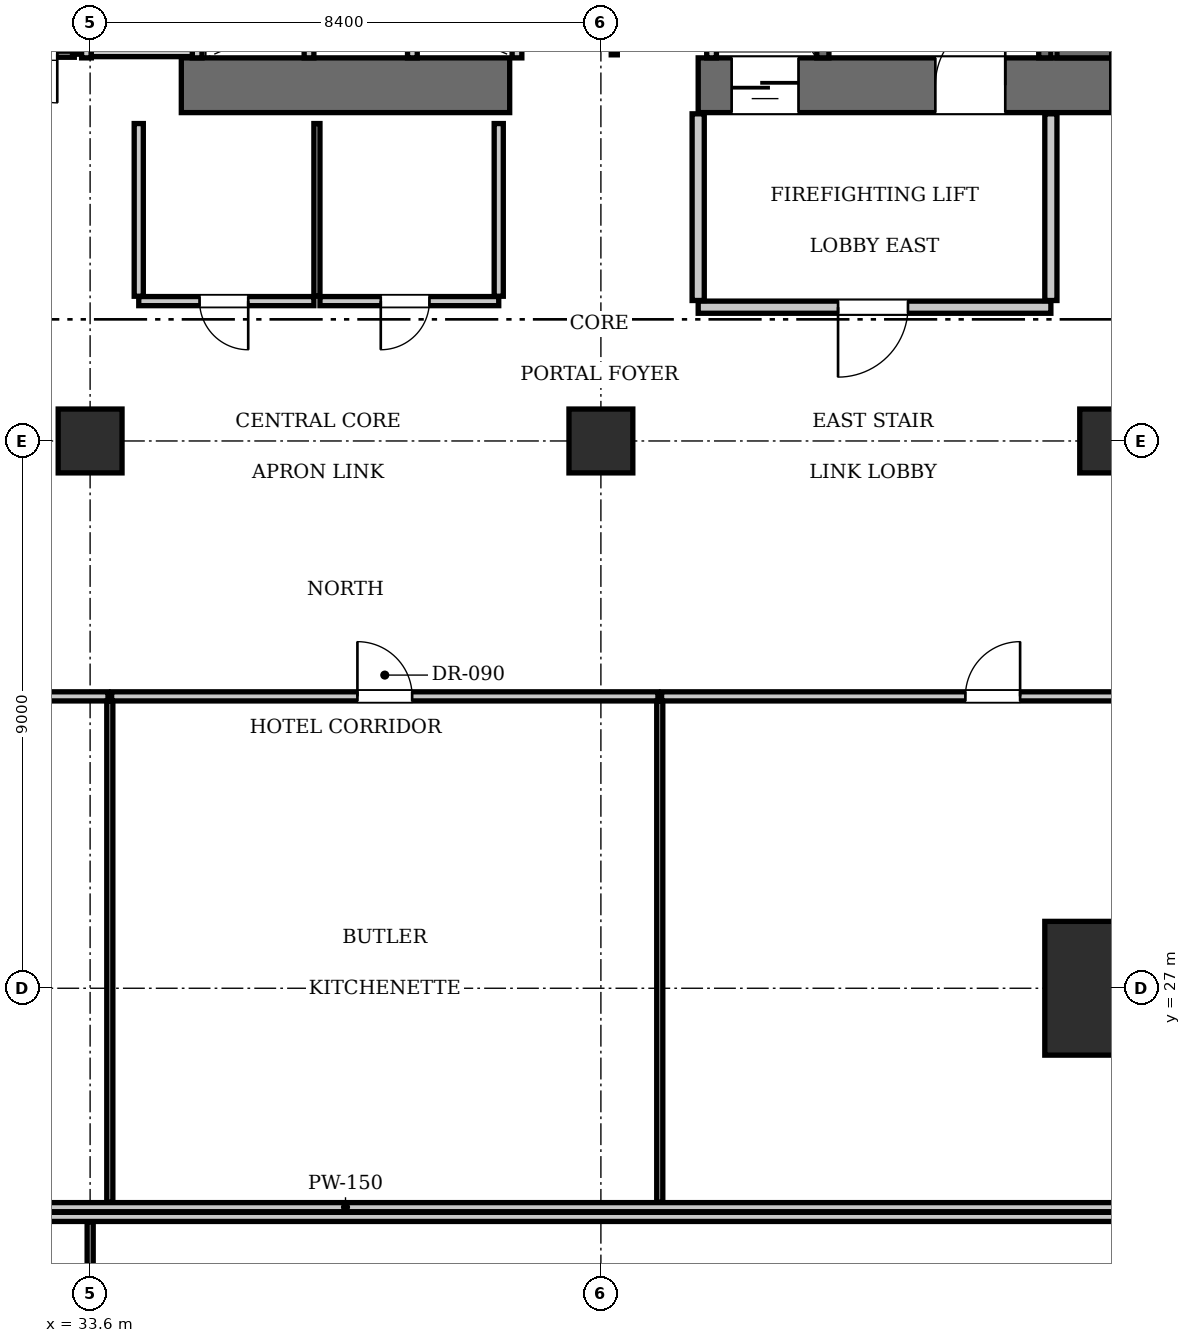
"""IFC4 building model, lengths in metres.
Left out: names, types, materials, properties, quantities, classifications, styles, units other than length and angle.
Written with IfcOpenShell. Run it as: python <this file> out.ifc"""

import sys

from ifc_helpers import new_model, si_unit, direction, frame, frame_2d, origin, origin_2d, place, context, subcontext, project, spatial, rectangle, extrude, element, fill, save


model = new_model("IFC4")
c1 = context("Model", 3, precision=1e-05, world=origin(), true_north=direction((0.0, 1.0)))
c2 = subcontext(c1, "Body", "Model", "MODEL_VIEW")
j1 = project(units=[si_unit("LENGTHUNIT", "METRE"), si_unit("PLANEANGLEUNIT", "RADIAN")], contexts=[c1])
p1 = place(None, origin())
s1 = spatial("IfcSite", under=j1, at=p1, CompositionType="ELEMENT")
p2 = place(p1, origin())
s2 = spatial("IfcBuilding", under=s1, at=p2, CompositionType="ELEMENT")
p3 = place(p2, frame((0.0, 0.0, 38.5)))
s3 = spatial("IfcBuildingStorey", under=s2, at=p3, CompositionType="ELEMENT", Elevation=38.5)
p4 = place(p3, frame((50.4, 27.0, 0.0), z_axis=(0.0, 0.0, 1.0), x_axis=(1.0, 0.0, 0.0)))
e1 = element("IfcColumn", 1, at=p4, inside=s3, PredefinedType="COLUMN", context=c2, shape_type="SweptSolid", body=[
    extrude(rectangle(XDim=2.2, YDim=2.2, at=origin_2d()), origin(), (0.0, 0.0, 1.0), 3.85),
])
p5 = place(p3, frame((35.1, 41.85, 0.0), z_axis=(0.0, 0.0, 1.0), x_axis=(1.0, 0.0, 0.0)))
e2 = element("IfcWall", 2, at=p5, inside=s3, PredefinedType="SHEAR", context=c2, shape_type="SweptSolid", body=[
    extrude(rectangle(XDim=5.4, YDim=0.9, at=frame_2d((2.7, 0.0))), origin(), (0.0, 0.0, 1.0), 3.85),
])
p6 = place(p3, frame((43.6, 41.85, 0.0), z_axis=(0.0, 0.0, 1.0), x_axis=(1.0, 0.0, 0.0)))
e3 = element("IfcWall", 3, at=p6, inside=s3, PredefinedType="SHEAR", context=c2, shape_type="SweptSolid", body=[
    extrude(rectangle(XDim=6.8, YDim=0.9, at=frame_2d((3.4, 0.0))), origin(), (0.0, 0.0, 1.0), 3.85),
])
p7 = place(p6, frame((3.9, 0.0, 0.0)))
e4 = element("IfcOpeningElement", 4, at=p7, cuts=e3, PredefinedType="OPENING", context=c2, shape_type="SweptSolid", body=[
    extrude(rectangle(XDim=1.15, YDim=2.15, at=frame_2d((0.575, 1.075))), frame((0.0, 0.46, 0.0), z_axis=(0.0, -1.0, 0.0), x_axis=(1.0, 0.0, 0.0)), (0.0, 0.0, 1.0), 0.92),
])
p8 = place(p6, frame((0.55, 0.0, 0.0)))
e5 = element("IfcOpeningElement", 5, at=p8, cuts=e3, PredefinedType="OPENING", context=c2, shape_type="SweptSolid", body=[
    extrude(rectangle(XDim=1.1, YDim=2.2, at=frame_2d((0.55, 1.1))), frame((0.0, 0.46, 0.0), z_axis=(0.0, -1.0, 0.0), x_axis=(1.0, 0.0, 0.0)), (0.0, 0.0, 1.0), 0.92),
])
p9 = place(p3, frame((49.95, 42.3, 0.0), z_axis=(0.0, 0.0, 1.0), x_axis=(0.0, 1.0, 0.0)))
e6 = element("IfcWall", 6, at=p9, inside=s3, PredefinedType="SHEAR", context=c2, shape_type="SweptSolid", body=[
    extrude(rectangle(XDim=1.6, YDim=0.9, at=frame_2d((0.8, 0.0))), origin(), (0.0, 0.0, 1.0), 3.85),
])
for number, where, z_axis, x_axis in (
    (7, (33.6, 36.0, 0.0), (0.0, 0.0, 1.0), (1.0, 0.0, 0.0)),
    (8, (42.0, 36.0, 0.0), (0.0, 0.0, 1.0), (1.0, 0.0, 0.0)),
    (9, (50.4, 36.0, 0.0), (0.0, 0.0, 1.0), (1.0, 0.0, 0.0)),
):
    element("IfcColumn", number, at=place(p3, frame(where, z_axis=z_axis, x_axis=x_axis)), inside=s3, PredefinedType="COLUMN", context=c2, shape_type="SweptSolid", body=[
        extrude(rectangle(XDim=1.05, YDim=1.05, at=origin_2d()), origin(), (0.0, 0.0, 1.0), 3.85),
    ])
p10 = place(p3, frame((45.65, 42.3, 0.0), z_axis=(0.0, 0.0, 1.0), x_axis=(0.0, 1.0, 0.0)))
e10 = element("IfcWall", 10, at=p10, inside=s3, PredefinedType="SOLIDWALL", context=c2, shape_type="SweptSolid", body=[
    extrude(rectangle(XDim=8.85, YDim=0.2, at=frame_2d((4.425, 0.0))), origin(), (0.0, 0.0, 1.0), 3.61),
])
p11 = place(p3, frame((49.3, 42.3, 0.0), z_axis=(0.0, 0.0, 1.0), x_axis=(0.0, 1.0, 0.0)))
e11 = element("IfcWall", 11, at=p11, inside=s3, PredefinedType="SOLIDWALL", context=c2, shape_type="SweptSolid", body=[
    extrude(rectangle(XDim=1.58, YDim=0.2, at=frame_2d((0.79, 0.0))), origin(), (0.0, 0.0, 1.0), 3.61),
])
p12 = place(p3, frame((43.82, 42.3, 0.0), z_axis=(0.0, 0.0, 1.0), x_axis=(0.0, 1.0, 0.0)))
e12 = element("IfcWall", 12, at=p12, inside=s3, PredefinedType="SOLIDWALL", context=c2, shape_type="SweptSolid", body=[
    extrude(rectangle(XDim=2.44, YDim=0.16, at=frame_2d((1.22, 0.0))), origin(), (0.0, 0.0, 1.0), 3.61),
])
for number, where, z_axis, x_axis in (
    (13, (37.2, 42.3, 0.0), (0.0, 0.0, 1.0), (0.0, 1.0, 0.0)),
    (14, (38.9, 42.3, 0.0), (0.0, 0.0, 1.0), (0.0, 1.0, 0.0)),
    (15, (40.62, 42.3, 0.0), (0.0, 0.0, 1.0), (0.0, 1.0, 0.0)),
):
    element("IfcWall", number, at=place(p3, frame(where, z_axis=z_axis, x_axis=x_axis)), inside=s3, PredefinedType="SOLIDWALL", context=c2, shape_type="SweptSolid", body=[
        extrude(rectangle(XDim=2.05, YDim=0.16, at=frame_2d((1.025, 0.0))), origin(), (0.0, 0.0, 1.0), 3.61),
    ])
for number, where, z_axis, x_axis in (
    (16, (33.54, 42.3, 0.0), (0.0, 0.0, 1.0), (0.0, 1.0, 0.0)),
    (17, (35.36, 42.3, 0.0), (0.0, 0.0, 1.0), (0.0, 1.0, 0.0)),
):
    element("IfcWall", number, at=place(p3, frame(where, z_axis=z_axis, x_axis=x_axis)), inside=s3, PredefinedType="SOLIDWALL", context=c2, shape_type="SweptSolid", body=[
        extrude(rectangle(XDim=2.1, YDim=0.16, at=frame_2d((1.05, 0.0))), origin(), (0.0, 0.0, 1.0), 3.61),
    ])
p13 = place(p3, frame((33.62, 42.4, 0.0), z_axis=(0.0, 0.0, 1.0), x_axis=(1.0, 0.0, 0.0)))
e18 = element("IfcWall", 18, at=p13, inside=s3, PredefinedType="SOLIDWALL", context=c2, shape_type="SweptSolid", body=[
    extrude(rectangle(XDim=1.66, YDim=0.16, at=frame_2d((0.83, 0.0))), origin(), (0.0, 0.0, 1.0), 3.61),
])
p14 = place(p3, frame((43.6, 38.2, 0.0), z_axis=(0.0, 0.0, 1.0), x_axis=(1.0, 0.0, 0.0)))
e19 = element("IfcWall", 19, at=p14, inside=s3, PredefinedType="PARTITIONING", context=c2, shape_type="SweptSolid", body=[
    extrude(rectangle(XDim=5.8, YDim=0.2, at=frame_2d((2.9, 0.0))), origin(), (0.0, 0.0, 1.0), 3.61),
])
p15 = place(p14, frame((2.3, 0.0, 0.0)))
e20 = element("IfcOpeningElement", 20, at=p15, cuts=e19, PredefinedType="OPENING", context=c2, shape_type="SweptSolid", body=[
    extrude(rectangle(XDim=1.15, YDim=2.15, at=frame_2d((0.575, 1.075))), frame((0.0, 0.11, 0.0), z_axis=(0.0, -1.0, 0.0), x_axis=(1.0, 0.0, 0.0)), (0.0, 0.0, 1.0), 0.22),
])
for number, where, z_axis, x_axis in (
    (21, (43.6, 38.31, 0.0), (0.0, 0.0, 1.0), (0.0, 1.0, 0.0)),
    (22, (49.4, 38.31, 0.0), (0.0, 0.0, 1.0), (0.0, 1.0, 0.0)),
):
    element("IfcWall", number, at=place(p3, frame(where, z_axis=z_axis, x_axis=x_axis)), inside=s3, PredefinedType="PARTITIONING", context=c2, shape_type="SweptSolid", body=[
        extrude(rectangle(XDim=3.07, YDim=0.2, at=frame_2d((1.535, 0.0))), origin(), (0.0, 0.0, 1.0), 3.61),
    ])
p16 = place(p3, frame((32.02, 42.36, 0.0), z_axis=(0.0, 0.0, 1.0), x_axis=(1.0, 0.0, 0.0)))
e23 = element("IfcWall", 23, at=p16, inside=s3, PredefinedType="PARTITIONING", context=c2, shape_type="SweptSolid", body=[
    extrude(rectangle(XDim=1.32, YDim=0.1, at=frame_2d((0.66, 0.0))), origin(), (0.0, 0.0, 1.0), 3.61),
])
p17 = place(p16, frame((0.24, 0.0, 0.0)))
e24 = element("IfcOpeningElement", 24, at=p17, cuts=e23, PredefinedType="OPENING", context=c2, shape_type="SweptSolid", body=[
    extrude(rectangle(XDim=0.8, YDim=2.05, at=frame_2d((0.4, 1.025))), frame((0.0, 0.06, 0.0), z_axis=(0.0, -1.0, 0.0), x_axis=(1.0, 0.0, 0.0)), (0.0, 0.0, 1.0), 0.12),
])
p18 = place(p3, frame((33.36, 42.36, 0.0), z_axis=(0.0, 0.0, 1.0), x_axis=(0.0, 1.0, 0.0)))
e25 = element("IfcWall", 25, at=p18, inside=s3, PredefinedType="PARTITIONING", context=c2, shape_type="SweptSolid", body=[
    extrude(rectangle(XDim=2.58, YDim=0.1, at=frame_2d((1.29, 0.0))), origin(), (0.0, 0.0, 1.0), 3.61),
])
p19 = place(p3, frame((42.22, 42.35, 0.0), z_axis=(0.0, 0.0, 1.0), x_axis=(0.0, 1.0, 0.0)))
e26 = element("IfcWall", 26, at=p19, inside=s3, PredefinedType="PARTITIONING", context=c2, shape_type="SweptSolid", body=[
    extrude(rectangle(XDim=2.61, YDim=0.1, at=frame_2d((1.305, 0.0))), origin(), (0.0, 0.0, 1.0), 3.61),
])
p20 = place(p19, frame((0.65, 0.0, 0.0)))
e27 = element("IfcOpeningElement", 27, at=p20, cuts=e26, PredefinedType="OPENING", context=c2, shape_type="SweptSolid", body=[
    extrude(rectangle(XDim=0.8, YDim=2.05, at=frame_2d((0.4, 1.025))), frame((0.0, 0.06, 0.0), z_axis=(0.0, -1.0, 0.0), x_axis=(1.0, 0.0, 0.0)), (0.0, 0.0, 1.0), 0.12),
])
p21 = place(p3, frame((34.4, 38.3, 0.0), z_axis=(0.0, 0.0, 1.0), x_axis=(1.0, 0.0, 0.0)))
e28 = element("IfcWall", 28, at=p21, inside=s3, PredefinedType="PARTITIONING", context=c2, shape_type="SweptSolid", body=[
    extrude(rectangle(XDim=2.88, YDim=0.15, at=frame_2d((1.44, 0.0))), origin(), (0.0, 0.0, 1.0), 3.61),
])
p22 = place(p21, frame((1.0, 0.0, 0.0)))
e29 = element("IfcOpeningElement", 29, at=p22, cuts=e28, PredefinedType="OPENING", context=c2, shape_type="SweptSolid", body=[
    extrude(rectangle(XDim=0.8, YDim=2.05, at=frame_2d((0.4, 1.025))), frame((0.0, 0.085, 0.0), z_axis=(0.0, -1.0, 0.0), x_axis=(1.0, 0.0, 0.0)), (0.0, 0.0, 1.0), 0.17),
])
p23 = place(p3, frame((37.38, 38.3, 0.0), z_axis=(0.0, 0.0, 1.0), x_axis=(1.0, 0.0, 0.0)))
e30 = element("IfcWall", 30, at=p23, inside=s3, PredefinedType="PARTITIONING", context=c2, shape_type="SweptSolid", body=[
    extrude(rectangle(XDim=2.94, YDim=0.15, at=frame_2d((1.47, 0.0))), origin(), (0.0, 0.0, 1.0), 3.61),
])
p24 = place(p23, frame((1.0, 0.0, 0.0)))
e31 = element("IfcOpeningElement", 31, at=p24, cuts=e30, PredefinedType="OPENING", context=c2, shape_type="SweptSolid", body=[
    extrude(rectangle(XDim=0.8, YDim=2.05, at=frame_2d((0.4, 1.025))), frame((0.0, 0.085, 0.0), z_axis=(0.0, -1.0, 0.0), x_axis=(1.0, 0.0, 0.0)), (0.0, 0.0, 1.0), 0.17),
])
p25 = place(p3, frame((34.4, 38.38, 0.0), z_axis=(0.0, 0.0, 1.0), x_axis=(0.0, 1.0, 0.0)))
e32 = element("IfcWall", 32, at=p25, inside=s3, PredefinedType="PARTITIONING", context=c2, shape_type="SweptSolid", body=[
    extrude(rectangle(XDim=2.84, YDim=0.15, at=frame_2d((1.42, 0.0))), origin(), (0.0, 0.0, 1.0), 3.61),
])
p26 = place(p3, frame((37.33, 38.38, 0.0), z_axis=(0.0, 0.0, 1.0), x_axis=(0.0, 1.0, 0.0)))
e33 = element("IfcWall", 33, at=p26, inside=s3, PredefinedType="PARTITIONING", context=c2, shape_type="SweptSolid", body=[
    extrude(rectangle(XDim=2.84, YDim=0.1, at=frame_2d((1.42, 0.0))), origin(), (0.0, 0.0, 1.0), 3.61),
])
p27 = place(p3, frame((40.32, 38.38, 0.0), z_axis=(0.0, 0.0, 1.0), x_axis=(0.0, 1.0, 0.0)))
e34 = element("IfcWall", 34, at=p27, inside=s3, PredefinedType="PARTITIONING", context=c2, shape_type="SweptSolid", body=[
    extrude(rectangle(XDim=2.84, YDim=0.15, at=frame_2d((1.42, 0.0))), origin(), (0.0, 0.0, 1.0), 3.61),
])
p28 = place(p3, frame((21.65, 23.4, 0.0), z_axis=(0.0, 0.0, 1.0), x_axis=(1.0, 0.0, 0.0)))
e35 = element("IfcWall", 35, at=p28, inside=s3, PredefinedType="PARTITIONING", context=c2, shape_type="SweptSolid", body=[
    extrude(rectangle(XDim=32.3, YDim=0.15, at=frame_2d((16.15, 0.0))), origin(), (0.0, 0.0, 1.0), 3.61),
])
p29 = place(p3, frame((26.848, 31.8, 0.0), z_axis=(0.0, 0.0, 1.0), x_axis=(1.0, 0.0, 0.0)))
e36 = element("IfcWall", 36, at=p29, inside=s3, PredefinedType="PARTITIONING", context=c2, shape_type="SweptSolid", body=[
    extrude(rectangle(XDim=7.046, YDim=0.15, at=frame_2d((3.523, 0.0))), origin(), (0.0, 0.0, 1.0), 3.61),
])
p30 = place(p29, frame((3.073, 0.0, 0.0)))
e37 = element("IfcOpeningElement", 37, at=p30, cuts=e36, PredefinedType="OPENING", context=c2, shape_type="SweptSolid", body=[
    extrude(rectangle(XDim=0.9, YDim=2.1, at=frame_2d((0.45, 1.05))), frame((0.0, 0.085, 0.0), z_axis=(0.0, -1.0, 0.0), x_axis=(1.0, 0.0, 0.0)), (0.0, 0.0, 1.0), 0.17),
])
p31 = place(p3, frame((33.924, 23.48, 0.0), z_axis=(0.0, 0.0, 1.0), x_axis=(0.0, 1.0, 0.0)))
e38 = element("IfcWall", 38, at=p31, inside=s3, PredefinedType="PARTITIONING", context=c2, shape_type="SweptSolid", body=[
    extrude(rectangle(XDim=8.24, YDim=0.1, at=frame_2d((4.12, 0.0))), origin(), (0.0, 0.0, 1.0), 3.61),
])
p32 = place(p3, frame((33.954, 31.8, 0.0), z_axis=(0.0, 0.0, 1.0), x_axis=(1.0, 0.0, 0.0)))
e39 = element("IfcWall", 39, at=p32, inside=s3, PredefinedType="PARTITIONING", context=c2, shape_type="SweptSolid", body=[
    extrude(rectangle(XDim=8.984, YDim=0.15, at=frame_2d((4.492, 0.0))), origin(), (0.0, 0.0, 1.0), 3.61),
])
p33 = place(p32, frame((4.042, 0.0, 0.0)))
e40 = element("IfcOpeningElement", 40, at=p33, cuts=e39, PredefinedType="OPENING", context=c2, shape_type="SweptSolid", body=[
    extrude(rectangle(XDim=0.9, YDim=2.1, at=frame_2d((0.45, 1.05))), frame((0.0, 0.085, 0.0), z_axis=(0.0, -1.0, 0.0), x_axis=(1.0, 0.0, 0.0)), (0.0, 0.0, 1.0), 0.17),
])
p34 = place(p3, frame((42.968, 23.48, 0.0), z_axis=(0.0, 0.0, 1.0), x_axis=(0.0, 1.0, 0.0)))
e41 = element("IfcWall", 41, at=p34, inside=s3, PredefinedType="PARTITIONING", context=c2, shape_type="SweptSolid", body=[
    extrude(rectangle(XDim=8.24, YDim=0.1, at=frame_2d((4.12, 0.0))), origin(), (0.0, 0.0, 1.0), 3.61),
])
p35 = place(p3, frame((42.998, 31.8, 0.0), z_axis=(0.0, 0.0, 1.0), x_axis=(1.0, 0.0, 0.0)))
e42 = element("IfcWall", 42, at=p35, inside=s3, PredefinedType="PARTITIONING", context=c2, shape_type="SweptSolid", body=[
    extrude(rectangle(XDim=10.892, YDim=0.15, at=frame_2d((5.446, 0.0))), origin(), (0.0, 0.0, 1.0), 3.61),
])
p36 = place(p35, frame((4.996, 0.0, 0.0)))
e43 = element("IfcOpeningElement", 43, at=p36, cuts=e42, PredefinedType="OPENING", context=c2, shape_type="SweptSolid", body=[
    extrude(rectangle(XDim=0.9, YDim=2.1, at=frame_2d((0.45, 1.05))), frame((0.0, 0.085, 0.0), z_axis=(0.0, -1.0, 0.0), x_axis=(1.0, 0.0, 0.0)), (0.0, 0.0, 1.0), 0.17),
])
p37 = place(p3, frame((21.65, 23.24, 0.0), z_axis=(0.0, 0.0, 1.0), x_axis=(1.0, 0.0, 0.0)))
e44 = element("IfcWall", 44, at=p37, inside=s3, PredefinedType="PARTITIONING", context=c2, shape_type="SweptSolid", body=[
    extrude(rectangle(XDim=32.3, YDim=0.15, at=frame_2d((16.15, 0.0))), origin(), (0.0, 0.0, 1.0), 3.61),
])
p38 = place(p3, frame((33.601, 14.93, 0.0), z_axis=(0.0, 0.0, 1.0), x_axis=(0.0, 1.0, 0.0)))
e45 = element("IfcWall", 45, at=p38, inside=s3, PredefinedType="PARTITIONING", context=c2, shape_type="SweptSolid", body=[
    extrude(rectangle(XDim=8.23, YDim=0.1, at=frame_2d((4.115, 0.0))), origin(), (0.0, 0.0, 1.0), 2.988),
])
p39 = place(p7, origin())
e46 = element("IfcDoor", 46, at=p39, inside=s3, OperationType="SINGLE_SWING_RIGHT", PredefinedType="DOOR", context=c2, shape_type="SweptSolid", body=[
    extrude(rectangle(XDim=1.15, YDim=2.15, at=frame_2d((0.575, 1.075))), frame((0.0, 0.025, 0.0), z_axis=(0.0, -1.0, 0.0), x_axis=(1.0, 0.0, 0.0)), (0.0, 0.0, 1.0), 0.05),
])
fill(e4, e46)
p40 = place(p8, frame((1.1, 0.0, 0.0), z_axis=(0.0, 0.0, 1.0), x_axis=(-1.0, 0.0, 0.0)))
e47 = element("IfcDoor", 47, at=p40, inside=s3, OperationType="SLIDING_TO_LEFT", PredefinedType="DOOR", context=c2, shape_type="SweptSolid", body=[
    extrude(rectangle(XDim=1.1, YDim=2.2, at=frame_2d((0.55, 1.1))), frame((0.0, 0.025, 0.0), z_axis=(0.0, -1.0, 0.0), x_axis=(1.0, 0.0, 0.0)), (0.0, 0.0, 1.0), 0.05),
])
fill(e5, e47)
p41 = place(p15, frame((1.15, 0.0, 0.0), z_axis=(0.0, 0.0, 1.0), x_axis=(-1.0, 0.0, 0.0)))
e48 = element("IfcDoor", 48, at=p41, inside=s3, OperationType="SINGLE_SWING_RIGHT", PredefinedType="DOOR", context=c2, shape_type="SweptSolid", body=[
    extrude(rectangle(XDim=1.15, YDim=2.15, at=frame_2d((0.575, 1.075))), frame((0.0, 0.025, 0.0), z_axis=(0.0, -1.0, 0.0), x_axis=(1.0, 0.0, 0.0)), (0.0, 0.0, 1.0), 0.05),
])
fill(e20, e48)
p42 = place(p17, frame((0.8, 0.0, 0.0), z_axis=(0.0, 0.0, 1.0), x_axis=(-1.0, 0.0, 0.0)))
e49 = element("IfcDoor", 49, at=p42, inside=s3, OperationType="SINGLE_SWING_LEFT", PredefinedType="DOOR", context=c2, shape_type="SweptSolid", body=[
    extrude(rectangle(XDim=0.8, YDim=2.05, at=frame_2d((0.4, 1.025))), frame((0.0, 0.025, 0.0), z_axis=(0.0, -1.0, 0.0), x_axis=(1.0, 0.0, 0.0)), (0.0, 0.0, 1.0), 0.05),
])
fill(e24, e49)
p43 = place(p22, frame((0.8, 0.0, 0.0), z_axis=(0.0, 0.0, 1.0), x_axis=(-1.0, 0.0, 0.0)))
e50 = element("IfcDoor", 50, at=p43, inside=s3, OperationType="SINGLE_SWING_LEFT", PredefinedType="DOOR", context=c2, shape_type="SweptSolid", body=[
    extrude(rectangle(XDim=0.8, YDim=2.05, at=frame_2d((0.4, 1.025))), frame((0.0, 0.025, 0.0), z_axis=(0.0, -1.0, 0.0), x_axis=(1.0, 0.0, 0.0)), (0.0, 0.0, 1.0), 0.05),
])
fill(e29, e50)
p44 = place(p24, frame((0.8, 0.0, 0.0), z_axis=(0.0, 0.0, 1.0), x_axis=(-1.0, 0.0, 0.0)))
e51 = element("IfcDoor", 51, at=p44, inside=s3, OperationType="SINGLE_SWING_RIGHT", PredefinedType="DOOR", context=c2, shape_type="SweptSolid", body=[
    extrude(rectangle(XDim=0.8, YDim=2.05, at=frame_2d((0.4, 1.025))), frame((0.0, 0.025, 0.0), z_axis=(0.0, -1.0, 0.0), x_axis=(1.0, 0.0, 0.0)), (0.0, 0.0, 1.0), 0.05),
])
fill(e31, e51)
p45 = place(p33, origin())
e52 = element("IfcDoor", 52, at=p45, inside=s3, OperationType="SINGLE_SWING_LEFT", PredefinedType="DOOR", context=c2, shape_type="SweptSolid", body=[
    extrude(rectangle(XDim=0.9, YDim=2.1, at=frame_2d((0.45, 1.05))), frame((0.0, 0.025, 0.0), z_axis=(0.0, -1.0, 0.0), x_axis=(1.0, 0.0, 0.0)), (0.0, 0.0, 1.0), 0.05),
])
fill(e40, e52)
p46 = place(p36, origin())
e53 = element("IfcDoor", 53, at=p46, inside=s3, OperationType="SINGLE_SWING_RIGHT", PredefinedType="DOOR", context=c2, shape_type="SweptSolid", body=[
    extrude(rectangle(XDim=0.9, YDim=2.1, at=frame_2d((0.45, 1.05))), frame((0.0, 0.025, 0.0), z_axis=(0.0, -1.0, 0.0), x_axis=(1.0, 0.0, 0.0)), (0.0, 0.0, 1.0), 0.05),
])
fill(e43, e53)
save(model, sys.argv[1])
